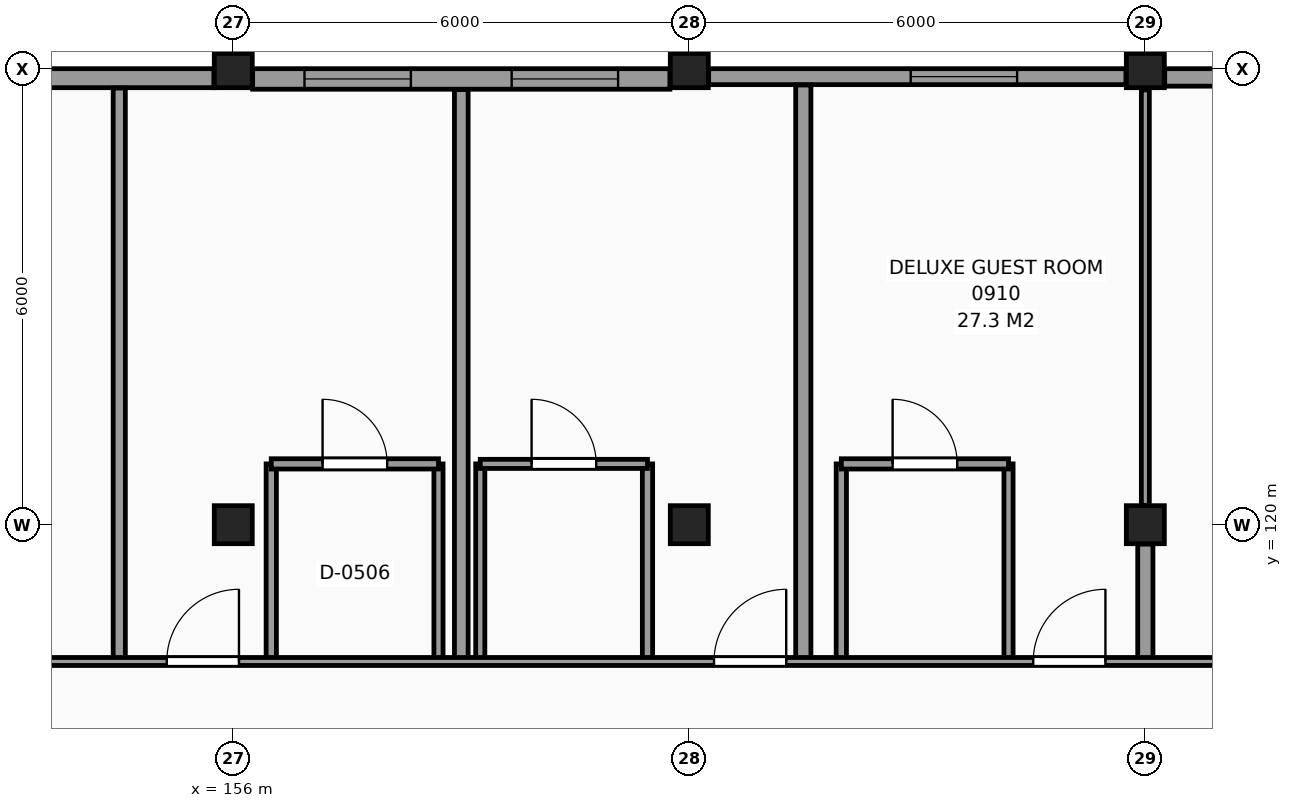
"""IFC4 building model, lengths in metres.
Left out: names, types, materials, properties, quantities, classifications, styles, units other than length and angle.
Written with IfcOpenShell. Run it as: python <this file> out.ifc"""

import sys

from ifc_helpers import new_model, si_unit, direction, frame, frame_2d, origin, origin_2d, place, context, subcontext, project, spatial, rectangle, extrude, element, fill, save


model = new_model("IFC4")
c1 = context("Model", 3, precision=1e-05, world=origin(), true_north=direction((0.0, 1.0)))
c2 = subcontext(c1, "Body", "Model", "MODEL_VIEW")
j1 = project(units=[si_unit("LENGTHUNIT", "METRE"), si_unit("PLANEANGLEUNIT", "RADIAN")], contexts=[c1])
p1 = place(None, origin())
s1 = spatial("IfcSite", under=j1, at=p1, CompositionType="ELEMENT")
p2 = place(p1, origin())
s2 = spatial("IfcBuilding", under=s1, at=p2, CompositionType="ELEMENT")
p3 = place(p2, frame((0.0, 0.0, 38.1)))
s3 = spatial("IfcBuildingStorey", under=s2, at=p3, CompositionType="ELEMENT", Elevation=38.1)
for number, where, z_axis, x_axis in (
    (1, (156.0, 120.0, 0.0), (0.0, 0.0, 1.0), (1.0, 0.0, 0.0)),
    (2, (156.0, 126.0, 0.0), (0.0, 0.0, 1.0), (1.0, 0.0, 0.0)),
    (3, (162.0, 120.0, 0.0), (0.0, 0.0, 1.0), (1.0, 0.0, 0.0)),
    (4, (162.0, 126.0, 0.0), (0.0, 0.0, 1.0), (1.0, 0.0, 0.0)),
    (5, (168.0, 120.0, 0.0), (0.0, 0.0, 1.0), (1.0, 0.0, 0.0)),
    (6, (168.0, 126.0, 0.0), (0.0, 0.0, 1.0), (1.0, 0.0, 0.0)),
):
    element("IfcColumn", number, at=place(p3, frame(where, z_axis=z_axis, x_axis=x_axis)), inside=s3, PredefinedType="COLUMN", context=c2, shape_type="SweptSolid", body=[
        extrude(rectangle(XDim=0.5, YDim=0.5, at=origin_2d()), origin(), (0.0, 0.0, 1.0), 3.3),
    ])
p4 = place(p3, frame((173.745, 125.885, 0.0), z_axis=(0.0, 0.0, 1.0), x_axis=(-1.0, 0.0, 0.0)))
e7 = element("IfcWall", 7, at=p4, inside=s3, PredefinedType="SOLIDWALL", context=c2, shape_type="SweptSolid", body=[
    extrude(rectangle(XDim=5.49, YDim=0.23, at=frame_2d((2.745, 0.0))), origin(), (0.0, 0.0, 1.0), 2.41),
])
p5 = place(p3, frame((167.745, 125.895, 0.0), z_axis=(0.0, 0.0, 1.0), x_axis=(-1.0, 0.0, 0.0)))
e8 = element("IfcWall", 8, at=p5, inside=s3, PredefinedType="SOLIDWALL", context=c2, shape_type="SweptSolid", body=[
    extrude(rectangle(XDim=5.49, YDim=0.21, at=frame_2d((2.745, 0.0))), origin(), (0.0, 0.0, 1.0), 2.41),
])
p6 = place(p5, frame((1.432, 0.0, 0.8)))
e9 = element("IfcOpeningElement", 9, at=p6, cuts=e8, PredefinedType="OPENING", context=c2, shape_type="SweptSolid", body=[
    extrude(rectangle(XDim=1.4, YDim=1.4, at=frame_2d((0.7, 0.7))), frame((0.0, 0.115, 0.0), z_axis=(0.0, -1.0, 0.0), x_axis=(1.0, 0.0, 0.0)), (0.0, 0.0, 1.0), 0.23),
])
p7 = place(p3, frame((161.745, 125.865, 0.0), z_axis=(0.0, 0.0, 1.0), x_axis=(-1.0, 0.0, 0.0)))
e10 = element("IfcWall", 10, at=p7, inside=s3, PredefinedType="SOLIDWALL", context=c2, shape_type="SweptSolid", body=[
    extrude(rectangle(XDim=5.49, YDim=0.27, at=frame_2d((2.745, 0.0))), origin(), (0.0, 0.0, 1.0), 2.41),
])
p8 = place(p7, frame((3.408, 0.0, 0.8)))
e11 = element("IfcOpeningElement", 11, at=p8, cuts=e10, PredefinedType="OPENING", context=c2, shape_type="SweptSolid", body=[
    extrude(rectangle(XDim=1.4, YDim=1.4, at=frame_2d((0.7, 0.7))), frame((0.0, 0.145, 0.0), z_axis=(0.0, -1.0, 0.0), x_axis=(1.0, 0.0, 0.0)), (0.0, 0.0, 1.0), 0.29),
])
p9 = place(p7, frame((0.682, 0.0, 0.8)))
e12 = element("IfcOpeningElement", 12, at=p9, cuts=e10, PredefinedType="OPENING", context=c2, shape_type="SweptSolid", body=[
    extrude(rectangle(XDim=1.4, YDim=1.4, at=frame_2d((0.7, 0.7))), frame((0.0, 0.145, 0.0), z_axis=(0.0, -1.0, 0.0), x_axis=(1.0, 0.0, 0.0)), (0.0, 0.0, 1.0), 0.29),
])
p10 = place(p3, frame((155.745, 125.875, 0.0), z_axis=(0.0, 0.0, 1.0), x_axis=(-1.0, 0.0, 0.0)))
e13 = element("IfcWall", 13, at=p10, inside=s3, PredefinedType="SOLIDWALL", context=c2, shape_type="SweptSolid", body=[
    extrude(rectangle(XDim=5.49, YDim=0.25, at=frame_2d((2.745, 0.0))), origin(), (0.0, 0.0, 1.0), 2.41),
])
p11 = place(p10, frame((2.658, 0.0, 0.8)))
e14 = element("IfcOpeningElement", 14, at=p11, cuts=e13, PredefinedType="OPENING", context=c2, shape_type="SweptSolid", body=[
    extrude(rectangle(XDim=1.4, YDim=1.4, at=frame_2d((0.7, 0.7))), frame((0.0, 0.135, 0.0), z_axis=(0.0, -1.0, 0.0), x_axis=(1.0, 0.0, 0.0)), (0.0, 0.0, 1.0), 0.27),
])
p12 = place(p3, frame((154.5, 118.2, 0.0), z_axis=(0.0, 0.0, 1.0), x_axis=(0.0, 1.0, 0.0)))
e15 = element("IfcWall", 15, at=p12, inside=s3, PredefinedType="PARTITIONING", context=c2, shape_type="SweptSolid", body=[
    extrude(rectangle(XDim=7.545, YDim=0.16, at=frame_2d((3.772, 0.0))), origin(), (0.0, 0.0, 1.0), 3.06),
])
p13 = place(p3, frame((156.5, 118.2, 0.0), z_axis=(0.0, 0.0, 1.0), x_axis=(0.0, 1.0, 0.0)))
e16 = element("IfcWall", 16, at=p13, inside=s3, PredefinedType="PARTITIONING", context=c2, shape_type="SweptSolid", body=[
    extrude(rectangle(XDim=2.6, YDim=0.135, at=frame_2d((1.3, 0.0))), origin(), (0.0, 0.0, 1.0), 3.06),
])
p14 = place(p3, frame((158.7, 118.2, 0.0), z_axis=(0.0, 0.0, 1.0), x_axis=(0.0, 1.0, 0.0)))
e17 = element("IfcWall", 17, at=p14, inside=s3, PredefinedType="PARTITIONING", context=c2, shape_type="SweptSolid", body=[
    extrude(rectangle(XDim=2.6, YDim=0.12, at=frame_2d((1.3, 0.0))), origin(), (0.0, 0.0, 1.0), 3.06),
])
p15 = place(p3, frame((159.0, 118.2, 0.0), z_axis=(0.0, 0.0, 1.0), x_axis=(0.0, 1.0, 0.0)))
e18 = element("IfcWall", 18, at=p15, inside=s3, PredefinedType="PARTITIONING", context=c2, shape_type="SweptSolid", body=[
    extrude(rectangle(XDim=7.525, YDim=0.18, at=frame_2d((3.763, 0.0))), origin(), (0.0, 0.0, 1.0), 3.06),
])
p16 = place(p3, frame((159.25, 118.2, 0.0), z_axis=(0.0, 0.0, 1.0), x_axis=(0.0, 1.0, 0.0)))
e19 = element("IfcWall", 19, at=p16, inside=s3, PredefinedType="PARTITIONING", context=c2, shape_type="SweptSolid", body=[
    extrude(rectangle(XDim=2.6, YDim=0.12, at=frame_2d((1.3, 0.0))), origin(), (0.0, 0.0, 1.0), 3.06),
])
p17 = place(p3, frame((161.45, 118.2, 0.0), z_axis=(0.0, 0.0, 1.0), x_axis=(0.0, 1.0, 0.0)))
e20 = element("IfcWall", 20, at=p17, inside=s3, PredefinedType="PARTITIONING", context=c2, shape_type="SweptSolid", body=[
    extrude(rectangle(XDim=2.6, YDim=0.135, at=frame_2d((1.3, 0.0))), origin(), (0.0, 0.0, 1.0), 3.06),
])
p18 = place(p3, frame((163.5, 118.2, 0.0), z_axis=(0.0, 0.0, 1.0), x_axis=(0.0, 1.0, 0.0)))
e21 = element("IfcWall", 21, at=p18, inside=s3, PredefinedType="PARTITIONING", context=c2, shape_type="SweptSolid", body=[
    extrude(rectangle(XDim=7.585, YDim=0.2, at=frame_2d((3.792, 0.0))), origin(), (0.0, 0.0, 1.0), 3.06),
])
p19 = place(p3, frame((164.0, 118.2, 0.0), z_axis=(0.0, 0.0, 1.0), x_axis=(0.0, 1.0, 0.0)))
e22 = element("IfcWall", 22, at=p19, inside=s3, PredefinedType="PARTITIONING", context=c2, shape_type="SweptSolid", body=[
    extrude(rectangle(XDim=2.6, YDim=0.135, at=frame_2d((1.3, 0.0))), origin(), (0.0, 0.0, 1.0), 3.06),
])
p20 = place(p3, frame((166.2, 118.2, 0.0), z_axis=(0.0, 0.0, 1.0), x_axis=(0.0, 1.0, 0.0)))
e23 = element("IfcWall", 23, at=p20, inside=s3, PredefinedType="PARTITIONING", context=c2, shape_type="SweptSolid", body=[
    extrude(rectangle(XDim=2.6, YDim=0.12, at=frame_2d((1.3, 0.0))), origin(), (0.0, 0.0, 1.0), 3.06),
])
p21 = place(p3, frame((168.0, 118.2, 0.0), z_axis=(0.0, 0.0, 1.0), x_axis=(0.0, 1.0, 0.0)))
e24 = element("IfcWall", 24, at=p21, inside=s3, PredefinedType="PARTITIONING", context=c2, shape_type="SweptSolid", body=[
    extrude(rectangle(XDim=1.545, YDim=0.2, at=frame_2d((0.772, 0.0))), origin(), (0.0, 0.0, 1.0), 2.72),
])
p22 = place(p3, frame((168.0, 120.255, 0.0), z_axis=(0.0, 0.0, 1.0), x_axis=(0.0, 1.0, 0.0)))
e25 = element("IfcWall", 25, at=p22, inside=s3, PredefinedType="PARTITIONING", context=c2, shape_type="SweptSolid", body=[
    extrude(rectangle(XDim=5.465, YDim=0.105, at=frame_2d((2.732, 0.0))), origin(), (0.0, 0.0, 1.0), 2.26),
])
p23 = place(p3, frame((102.215, 118.2, 0.0), z_axis=(0.0, 0.0, 1.0), x_axis=(1.0, 0.0, 0.0)))
e26 = element("IfcWall", 26, at=p23, inside=s3, PredefinedType="PARTITIONING", context=c2, shape_type="SweptSolid", body=[
    extrude(rectangle(XDim=74.285, YDim=0.105, at=frame_2d((37.143, 0.0))), origin(), (0.0, 0.0, 1.0), 3.06),
])
p24 = place(p23, frame((2.36, 0.0, 0.0)))
e27 = element("IfcOpeningElement", 27, at=p24, cuts=e26, PredefinedType="OPENING", context=c2, shape_type="SweptSolid", body=[
    extrude(rectangle(XDim=0.95, YDim=2.1, at=frame_2d((0.475, 1.05))), frame((0.0, 0.062, 0.0), z_axis=(0.0, -1.0, 0.0), x_axis=(1.0, 0.0, 0.0)), (0.0, 0.0, 1.0), 0.125),
])
p25 = place(p23, frame((9.41, 0.0, 0.0)))
e28 = element("IfcOpeningElement", 28, at=p25, cuts=e26, PredefinedType="OPENING", context=c2, shape_type="SweptSolid", body=[
    extrude(rectangle(XDim=0.95, YDim=2.1, at=frame_2d((0.475, 1.05))), frame((0.0, 0.062, 0.0), z_axis=(0.0, -1.0, 0.0), x_axis=(1.0, 0.0, 0.0)), (0.0, 0.0, 1.0), 0.125),
])
p26 = place(p23, frame((18.51, 0.0, 0.0)))
e29 = element("IfcOpeningElement", 29, at=p26, cuts=e26, PredefinedType="OPENING", context=c2, shape_type="SweptSolid", body=[
    extrude(rectangle(XDim=0.95, YDim=2.1, at=frame_2d((0.475, 1.05))), frame((0.0, 0.062, 0.0), z_axis=(0.0, -1.0, 0.0), x_axis=(1.0, 0.0, 0.0)), (0.0, 0.0, 1.0), 0.125),
])
p27 = place(p23, frame((32.36, 0.0, 0.0)))
e30 = element("IfcOpeningElement", 30, at=p27, cuts=e26, PredefinedType="OPENING", context=c2, shape_type="SweptSolid", body=[
    extrude(rectangle(XDim=0.95, YDim=2.1, at=frame_2d((0.475, 1.05))), frame((0.0, 0.062, 0.0), z_axis=(0.0, -1.0, 0.0), x_axis=(1.0, 0.0, 0.0)), (0.0, 0.0, 1.0), 0.125),
])
p28 = place(p23, frame((34.91, 0.0, 0.0)))
e31 = element("IfcOpeningElement", 31, at=p28, cuts=e26, PredefinedType="OPENING", context=c2, shape_type="SweptSolid", body=[
    extrude(rectangle(XDim=0.95, YDim=2.1, at=frame_2d((0.475, 1.05))), frame((0.0, 0.062, 0.0), z_axis=(0.0, -1.0, 0.0), x_axis=(1.0, 0.0, 0.0)), (0.0, 0.0, 1.0), 0.125),
])
p29 = place(p23, frame((42.11, 0.0, 0.0)))
e32 = element("IfcOpeningElement", 32, at=p29, cuts=e26, PredefinedType="OPENING", context=c2, shape_type="SweptSolid", body=[
    extrude(rectangle(XDim=0.95, YDim=2.1, at=frame_2d((0.475, 1.05))), frame((0.0, 0.062, 0.0), z_axis=(0.0, -1.0, 0.0), x_axis=(1.0, 0.0, 0.0)), (0.0, 0.0, 1.0), 0.125),
])
p30 = place(p23, frame((50.36, 0.0, 0.0)))
e33 = element("IfcOpeningElement", 33, at=p30, cuts=e26, PredefinedType="OPENING", context=c2, shape_type="SweptSolid", body=[
    extrude(rectangle(XDim=0.95, YDim=2.1, at=frame_2d((0.475, 1.05))), frame((0.0, 0.062, 0.0), z_axis=(0.0, -1.0, 0.0), x_axis=(1.0, 0.0, 0.0)), (0.0, 0.0, 1.0), 0.125),
])
p31 = place(p23, frame((52.91, 0.0, 0.0)))
e34 = element("IfcOpeningElement", 34, at=p31, cuts=e26, PredefinedType="OPENING", context=c2, shape_type="SweptSolid", body=[
    extrude(rectangle(XDim=0.95, YDim=2.1, at=frame_2d((0.475, 1.05))), frame((0.0, 0.062, 0.0), z_axis=(0.0, -1.0, 0.0), x_axis=(1.0, 0.0, 0.0)), (0.0, 0.0, 1.0), 0.125),
])
p32 = place(p23, frame((60.11, 0.0, 0.0)))
e35 = element("IfcOpeningElement", 35, at=p32, cuts=e26, PredefinedType="OPENING", context=c2, shape_type="SweptSolid", body=[
    extrude(rectangle(XDim=0.95, YDim=2.1, at=frame_2d((0.475, 1.05))), frame((0.0, 0.062, 0.0), z_axis=(0.0, -1.0, 0.0), x_axis=(1.0, 0.0, 0.0)), (0.0, 0.0, 1.0), 0.125),
])
p33 = place(p23, frame((64.31, 0.0, 0.0)))
e36 = element("IfcOpeningElement", 36, at=p33, cuts=e26, PredefinedType="OPENING", context=c2, shape_type="SweptSolid", body=[
    extrude(rectangle(XDim=0.95, YDim=2.1, at=frame_2d((0.475, 1.05))), frame((0.0, 0.062, 0.0), z_axis=(0.0, -1.0, 0.0), x_axis=(1.0, 0.0, 0.0)), (0.0, 0.0, 1.0), 0.125),
])
p34 = place(p23, frame((68.26, 0.0, 0.0)))
e37 = element("IfcOpeningElement", 37, at=p34, cuts=e26, PredefinedType="OPENING", context=c2, shape_type="SweptSolid", body=[
    extrude(rectangle(XDim=0.95, YDim=2.1, at=frame_2d((0.475, 1.05))), frame((0.0, 0.062, 0.0), z_axis=(0.0, -1.0, 0.0), x_axis=(1.0, 0.0, 0.0)), (0.0, 0.0, 1.0), 0.125),
])
p35 = place(p3, frame((156.5, 120.8, 0.0), z_axis=(0.0, 0.0, 1.0), x_axis=(1.0, 0.0, 0.0)))
e38 = element("IfcWall", 38, at=p35, inside=s3, PredefinedType="PARTITIONING", context=c2, shape_type="SweptSolid", body=[
    extrude(rectangle(XDim=2.2, YDim=0.135, at=frame_2d((1.1, 0.0))), origin(), (0.0, 0.0, 1.0), 3.06),
])
p36 = place(p35, frame((0.675, 0.0, 0.0)))
e39 = element("IfcOpeningElement", 39, at=p36, cuts=e38, PredefinedType="OPENING", context=c2, shape_type="SweptSolid", body=[
    extrude(rectangle(XDim=0.85, YDim=2.1, at=frame_2d((0.425, 1.05))), frame((0.0, 0.078, 0.0), z_axis=(0.0, -1.0, 0.0), x_axis=(1.0, 0.0, 0.0)), (0.0, 0.0, 1.0), 0.155),
])
p37 = place(p3, frame((159.25, 120.8, 0.0), z_axis=(0.0, 0.0, 1.0), x_axis=(1.0, 0.0, 0.0)))
e40 = element("IfcWall", 40, at=p37, inside=s3, PredefinedType="PARTITIONING", context=c2, shape_type="SweptSolid", body=[
    extrude(rectangle(XDim=2.2, YDim=0.12, at=frame_2d((1.1, 0.0))), origin(), (0.0, 0.0, 1.0), 3.06),
])
p38 = place(p37, frame((0.675, 0.0, 0.0)))
e41 = element("IfcOpeningElement", 41, at=p38, cuts=e40, PredefinedType="OPENING", context=c2, shape_type="SweptSolid", body=[
    extrude(rectangle(XDim=0.85, YDim=2.1, at=frame_2d((0.425, 1.05))), frame((0.0, 0.07, 0.0), z_axis=(0.0, -1.0, 0.0), x_axis=(1.0, 0.0, 0.0)), (0.0, 0.0, 1.0), 0.14),
])
p39 = place(p3, frame((164.0, 120.8, 0.0), z_axis=(0.0, 0.0, 1.0), x_axis=(1.0, 0.0, 0.0)))
e42 = element("IfcWall", 42, at=p39, inside=s3, PredefinedType="PARTITIONING", context=c2, shape_type="SweptSolid", body=[
    extrude(rectangle(XDim=2.2, YDim=0.135, at=frame_2d((1.1, 0.0))), origin(), (0.0, 0.0, 1.0), 3.06),
])
p40 = place(p39, frame((0.675, 0.0, 0.0)))
e43 = element("IfcOpeningElement", 43, at=p40, cuts=e42, PredefinedType="OPENING", context=c2, shape_type="SweptSolid", body=[
    extrude(rectangle(XDim=0.85, YDim=2.1, at=frame_2d((0.425, 1.05))), frame((0.0, 0.078, 0.0), z_axis=(0.0, -1.0, 0.0), x_axis=(1.0, 0.0, 0.0)), (0.0, 0.0, 1.0), 0.155),
])
p41 = place(p8, origin())
e44 = element("IfcWindow", 44, at=p41, inside=s3, PartitioningType="SINGLE_PANEL", PredefinedType="WINDOW", context=c2, shape_type="SweptSolid", body=[
    extrude(rectangle(XDim=1.4, YDim=1.4, at=frame_2d((0.7, 0.7))), frame((0.0, 0.03, 0.0), z_axis=(0.0, -1.0, 0.0), x_axis=(1.0, 0.0, 0.0)), (0.0, 0.0, 1.0), 0.06),
])
fill(e11, e44)
p42 = place(p9, origin())
e45 = element("IfcWindow", 45, at=p42, inside=s3, PartitioningType="SINGLE_PANEL", PredefinedType="WINDOW", context=c2, shape_type="SweptSolid", body=[
    extrude(rectangle(XDim=1.4, YDim=1.4, at=frame_2d((0.7, 0.7))), frame((0.0, 0.03, 0.0), z_axis=(0.0, -1.0, 0.0), x_axis=(1.0, 0.0, 0.0)), (0.0, 0.0, 1.0), 0.06),
])
fill(e12, e45)
p43 = place(p6, origin())
e46 = element("IfcWindow", 46, at=p43, inside=s3, PartitioningType="SINGLE_PANEL", PredefinedType="WINDOW", context=c2, shape_type="SweptSolid", body=[
    extrude(rectangle(XDim=1.4, YDim=1.4, at=frame_2d((0.7, 0.7))), frame((0.0, 0.03, 0.0), z_axis=(0.0, -1.0, 0.0), x_axis=(1.0, 0.0, 0.0)), (0.0, 0.0, 1.0), 0.06),
])
fill(e9, e46)
p44 = place(p36, origin())
e47 = element("IfcDoor", 47, at=p44, inside=s3, OperationType="SINGLE_SWING_LEFT", PredefinedType="DOOR", context=c2, shape_type="SweptSolid", body=[
    extrude(rectangle(XDim=0.85, YDim=2.1, at=frame_2d((0.425, 1.05))), frame((0.0, 0.025, 0.0), z_axis=(0.0, -1.0, 0.0), x_axis=(1.0, 0.0, 0.0)), (0.0, 0.0, 1.0), 0.05),
])
fill(e39, e47)
p45 = place(p31, origin())
e48 = element("IfcDoor", 48, at=p45, inside=s3, OperationType="SINGLE_SWING_RIGHT", PredefinedType="DOOR", context=c2, shape_type="SweptSolid", body=[
    extrude(rectangle(XDim=0.95, YDim=2.1, at=frame_2d((0.475, 1.05))), frame((0.0, 0.025, 0.0), z_axis=(0.0, -1.0, 0.0), x_axis=(1.0, 0.0, 0.0)), (0.0, 0.0, 1.0), 0.05),
])
fill(e34, e48)
p46 = place(p38, origin())
e49 = element("IfcDoor", 49, at=p46, inside=s3, OperationType="SINGLE_SWING_LEFT", PredefinedType="DOOR", context=c2, shape_type="SweptSolid", body=[
    extrude(rectangle(XDim=0.85, YDim=2.1, at=frame_2d((0.425, 1.05))), frame((0.0, 0.025, 0.0), z_axis=(0.0, -1.0, 0.0), x_axis=(1.0, 0.0, 0.0)), (0.0, 0.0, 1.0), 0.05),
])
fill(e41, e49)
p47 = place(p32, origin())
e50 = element("IfcDoor", 50, at=p47, inside=s3, OperationType="SINGLE_SWING_RIGHT", PredefinedType="DOOR", context=c2, shape_type="SweptSolid", body=[
    extrude(rectangle(XDim=0.95, YDim=2.1, at=frame_2d((0.475, 1.05))), frame((0.0, 0.025, 0.0), z_axis=(0.0, -1.0, 0.0), x_axis=(1.0, 0.0, 0.0)), (0.0, 0.0, 1.0), 0.05),
])
fill(e35, e50)
p48 = place(p40, origin())
e51 = element("IfcDoor", 51, at=p48, inside=s3, OperationType="SINGLE_SWING_LEFT", PredefinedType="DOOR", context=c2, shape_type="SweptSolid", body=[
    extrude(rectangle(XDim=0.85, YDim=2.1, at=frame_2d((0.425, 1.05))), frame((0.0, 0.025, 0.0), z_axis=(0.0, -1.0, 0.0), x_axis=(1.0, 0.0, 0.0)), (0.0, 0.0, 1.0), 0.05),
])
fill(e43, e51)
p49 = place(p33, origin())
e52 = element("IfcDoor", 52, at=p49, inside=s3, OperationType="SINGLE_SWING_RIGHT", PredefinedType="DOOR", context=c2, shape_type="SweptSolid", body=[
    extrude(rectangle(XDim=0.95, YDim=2.1, at=frame_2d((0.475, 1.05))), frame((0.0, 0.025, 0.0), z_axis=(0.0, -1.0, 0.0), x_axis=(1.0, 0.0, 0.0)), (0.0, 0.0, 1.0), 0.05),
])
fill(e36, e52)
save(model, sys.argv[1])
